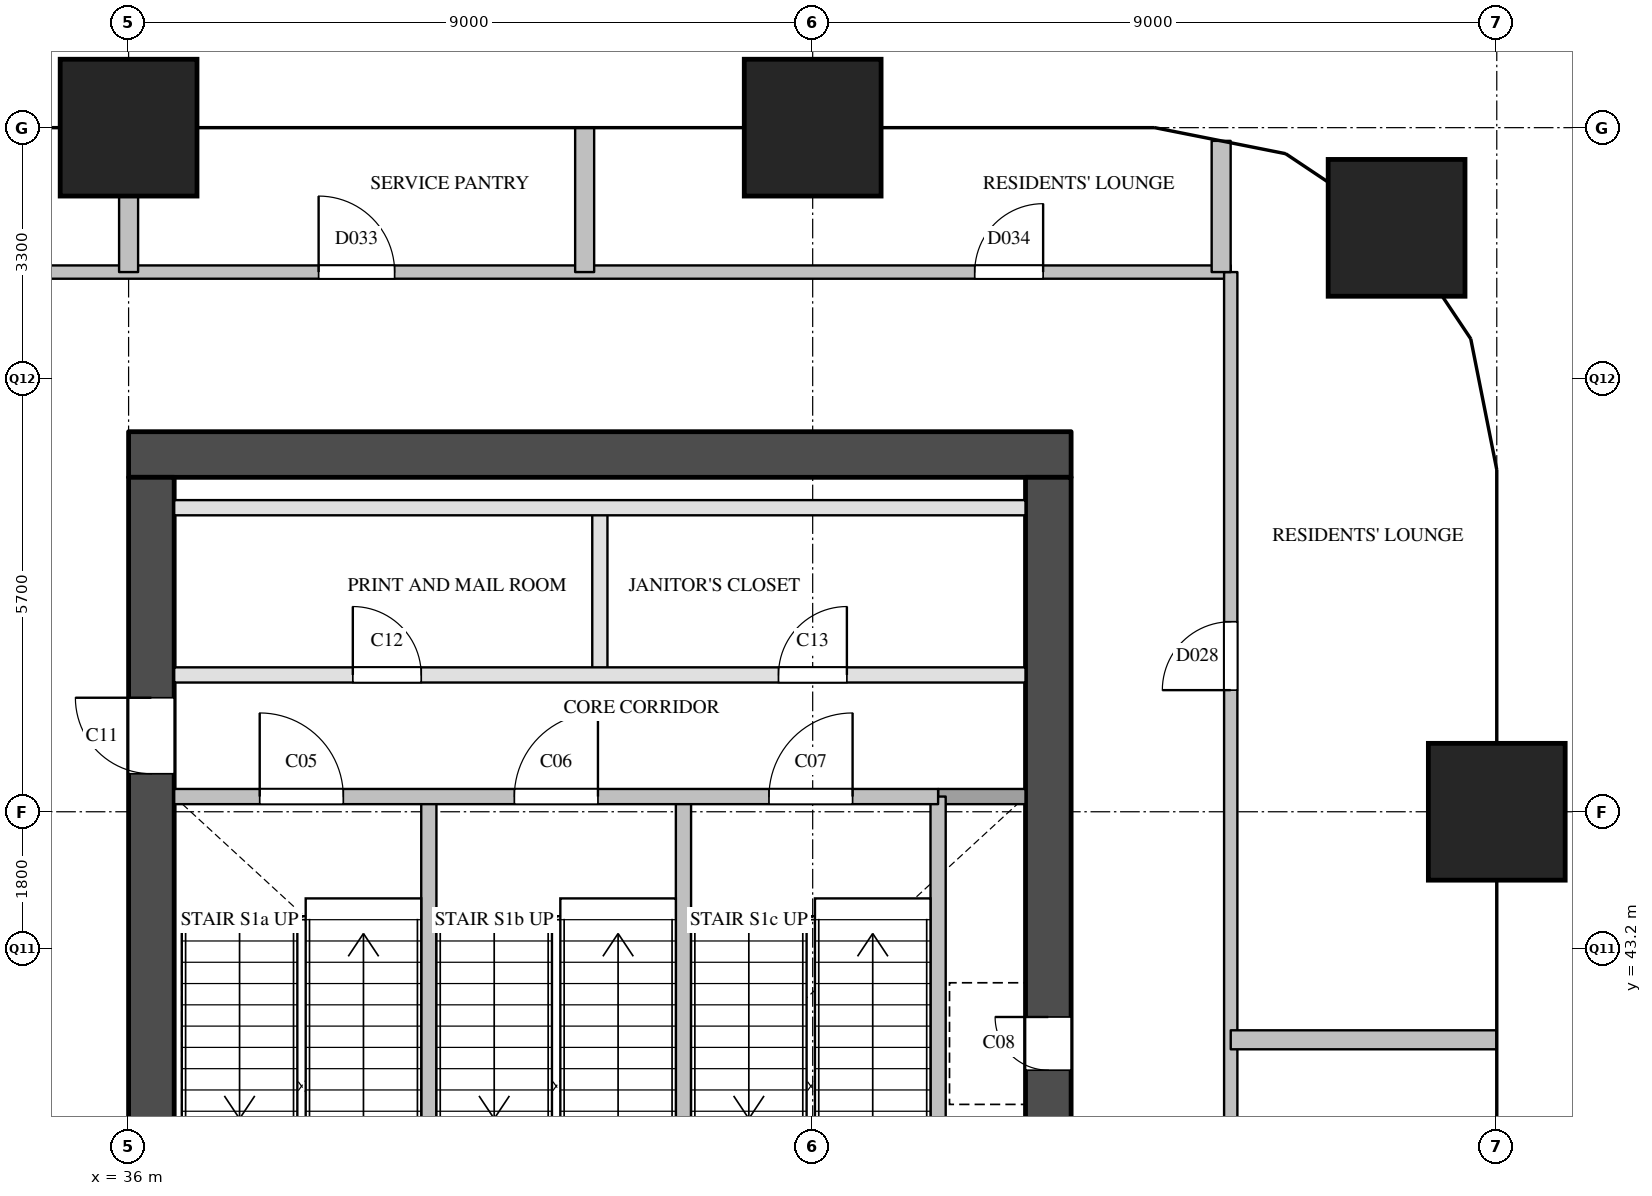
"""IFC4 building model, lengths in metres.
Left out: names, types, materials, properties, quantities, classifications, styles, units other than length and angle.
Written with IfcOpenShell. Run it as: python <this file> out.ifc"""

import sys

from ifc_helpers import new_model, si_unit, direction, frame, frame_2d, origin, origin_2d, place, context, subcontext, project, spatial, rectangle, extrude, element, fill, save


model = new_model("IFC4")
c1 = context("Model", 3, precision=1e-05, world=origin(), true_north=direction((0.0, 1.0)))
c2 = subcontext(c1, "Body", "Model", "MODEL_VIEW")
j1 = project(units=[si_unit("LENGTHUNIT", "METRE"), si_unit("PLANEANGLEUNIT", "RADIAN")], contexts=[c1])
p1 = place(None, origin())
s1 = spatial("IfcSite", under=j1, at=p1, CompositionType="ELEMENT")
p2 = place(p1, origin())
s2 = spatial("IfcBuilding", under=s1, at=p2, CompositionType="ELEMENT")
p3 = place(p2, frame((0.0, 0.0, 46.2)))
s3 = spatial("IfcBuildingStorey", under=s2, at=p3, CompositionType="ELEMENT", Elevation=46.2)
for number, where, z_axis, x_axis in (
    (1, (36.0, 54.0, 0.0), (0.0, 0.0, 1.0), (1.0, 0.0, 0.0)),
    (2, (45.0, 54.0, 0.0), (0.0, 0.0, 1.0), (1.0, 0.0, 0.0)),
    (3, (54.0, 45.0, 0.0), (0.0, 0.0, 1.0), (1.0, 0.0, 0.0)),
    (4, (52.682, 52.682, 0.0), (0.0, 0.0, 1.0), (1.0, 0.0, 0.0)),
):
    element("IfcColumn", number, at=place(p3, frame(where, z_axis=z_axis, x_axis=x_axis)), inside=s3, PredefinedType="COLUMN", context=c2, shape_type="SweptSolid", body=[
        extrude(rectangle(XDim=1.8, YDim=1.8, at=origin_2d()), origin(), (0.0, 0.0, 1.0), 3.8),
    ])
p4 = place(p3, frame((36.0, 49.7, 0.0), z_axis=(0.0, 0.0, 1.0), x_axis=(1.0, 0.0, 0.0)))
e5 = element("IfcWall", 5, at=p4, inside=s3, PredefinedType="SHEAR", context=c2, shape_type="SweptSolid", body=[
    extrude(rectangle(XDim=12.4, YDim=0.6, at=frame_2d((6.2, 0.0))), origin(), (0.0, 0.0, 1.0), 3.5),
])
p5 = place(p3, frame((36.3, 29.1, 0.0), z_axis=(0.0, 0.0, 1.0), x_axis=(0.0, 1.0, 0.0)))
e6 = element("IfcWall", 6, at=p5, inside=s3, PredefinedType="SHEAR", context=c2, shape_type="SweptSolid", body=[
    extrude(rectangle(XDim=20.3, YDim=0.6, at=frame_2d((10.15, 0.0))), origin(), (0.0, 0.0, 1.0), 3.5),
])
p6 = place(p5, frame((3.6, 0.0, 0.0)))
e7 = element("IfcOpeningElement", 7, at=p6, cuts=e6, PredefinedType="OPENING", context=c2, shape_type="SweptSolid", body=[
    extrude(rectangle(XDim=1.8, YDim=2.1, at=frame_2d((0.9, 1.05))), frame((0.0, 0.31, 0.0), z_axis=(0.0, -1.0, 0.0), x_axis=(1.0, 0.0, 0.0)), (0.0, 0.0, 1.0), 0.62),
])
p7 = place(p5, frame((16.4, 0.0, 0.0)))
e8 = element("IfcOpeningElement", 8, at=p7, cuts=e6, PredefinedType="OPENING", context=c2, shape_type="SweptSolid", body=[
    extrude(rectangle(XDim=1.0, YDim=2.1, at=frame_2d((0.5, 1.05))), frame((0.0, 0.31, 0.0), z_axis=(0.0, -1.0, 0.0), x_axis=(1.0, 0.0, 0.0)), (0.0, 0.0, 1.0), 0.62),
])
p8 = place(p3, frame((48.1, 29.1, 0.0), z_axis=(0.0, 0.0, 1.0), x_axis=(0.0, 1.0, 0.0)))
e9 = element("IfcWall", 9, at=p8, inside=s3, PredefinedType="SHEAR", context=c2, shape_type="SweptSolid", body=[
    extrude(rectangle(XDim=20.3, YDim=0.6, at=frame_2d((10.15, 0.0))), origin(), (0.0, 0.0, 1.0), 3.5),
])
p9 = place(p8, frame((12.5, 0.0, 0.0)))
e10 = element("IfcOpeningElement", 10, at=p9, cuts=e9, PredefinedType="OPENING", context=c2, shape_type="SweptSolid", body=[
    extrude(rectangle(XDim=0.7, YDim=2.1, at=frame_2d((0.35, 1.05))), frame((0.0, 0.31, 0.0), z_axis=(0.0, -1.0, 0.0), x_axis=(1.0, 0.0, 0.0)), (0.0, 0.0, 1.0), 0.62),
])
p10 = place(p8, frame((3.9, 0.0, 0.0)))
e11 = element("IfcOpeningElement", 11, at=p10, cuts=e9, PredefinedType="OPENING", context=c2, shape_type="SweptSolid", body=[
    extrude(rectangle(XDim=1.8, YDim=2.1, at=frame_2d((0.9, 1.05))), frame((0.0, 0.31, 0.0), z_axis=(0.0, -1.0, 0.0), x_axis=(1.0, 0.0, 0.0)), (0.0, 0.0, 1.0), 0.62),
])
p11 = place(p3, frame((39.95, 40.78, 0.0), z_axis=(0.0, 0.0, 1.0), x_axis=(0.0, 1.0, 0.0)))
e12 = element("IfcWall", 12, at=p11, inside=s3, PredefinedType="SOLIDWALL", context=c2, shape_type="SweptSolid", body=[
    extrude(rectangle(XDim=4.42, YDim=0.2, at=frame_2d((2.21, 0.0))), origin(), (0.0, 0.0, 1.0), 3.5),
])
p12 = place(p3, frame((42.2, 46.8, 0.0), z_axis=(0.0, 0.0, 1.0), x_axis=(0.0, 1.0, 0.0)))
e13 = element("IfcWall", 13, at=p12, inside=s3, PredefinedType="PARTITIONING", context=c2, shape_type="SweptSolid", body=[
    extrude(rectangle(XDim=2.2, YDim=0.2, at=frame_2d((1.1, 0.0))), origin(), (0.0, 0.0, 1.0), 3.5),
])
for number, where, z_axis, x_axis in (
    (14, (43.3, 40.78, 0.0), (0.0, 0.0, 1.0), (0.0, 1.0, 0.0)),
    (15, (46.65, 40.78, 0.0), (0.0, 0.0, 1.0), (0.0, 1.0, 0.0)),
):
    element("IfcWall", number, at=place(p3, frame(where, z_axis=z_axis, x_axis=x_axis)), inside=s3, PredefinedType="SOLIDWALL", context=c2, shape_type="SweptSolid", body=[
        extrude(rectangle(XDim=4.42, YDim=0.2, at=frame_2d((2.21, 0.0))), origin(), (0.0, 0.0, 1.0), 3.5),
    ])
p13 = place(p3, frame((46.65, 45.2, 0.0), z_axis=(0.0, 0.0, 1.0), x_axis=(1.0, 0.0, 0.0)))
e16 = element("IfcWall", 16, at=p13, inside=s3, PredefinedType="SOLIDWALL", context=c2, shape_type="SweptSolid", body=[
    extrude(rectangle(XDim=1.15, YDim=0.2, at=frame_2d((0.575, 0.0))), origin(), (0.0, 0.0, 1.0), 3.5),
])
p14 = place(p3, frame((36.6, 45.2, 0.0), z_axis=(0.0, 0.0, 1.0), x_axis=(1.0, 0.0, 0.0)))
e17 = element("IfcWall", 17, at=p14, inside=s3, PredefinedType="SOLIDWALL", context=c2, shape_type="SweptSolid", body=[
    extrude(rectangle(XDim=10.05, YDim=0.2, at=frame_2d((5.025, 0.0))), origin(), (0.0, 0.0, 1.0), 3.5),
])
p15 = place(p14, frame((1.125, 0.0, 0.0)))
e18 = element("IfcOpeningElement", 18, at=p15, cuts=e17, PredefinedType="OPENING", context=c2, shape_type="SweptSolid", body=[
    extrude(rectangle(XDim=1.1, YDim=2.1, at=frame_2d((0.55, 1.05))), frame((0.0, 0.11, 0.0), z_axis=(0.0, -1.0, 0.0), x_axis=(1.0, 0.0, 0.0)), (0.0, 0.0, 1.0), 0.22),
])
p16 = place(p14, frame((4.475, 0.0, 0.0)))
e19 = element("IfcOpeningElement", 19, at=p16, cuts=e17, PredefinedType="OPENING", context=c2, shape_type="SweptSolid", body=[
    extrude(rectangle(XDim=1.1, YDim=2.1, at=frame_2d((0.55, 1.05))), frame((0.0, 0.11, 0.0), z_axis=(0.0, -1.0, 0.0), x_axis=(1.0, 0.0, 0.0)), (0.0, 0.0, 1.0), 0.22),
])
p17 = place(p14, frame((7.825, 0.0, 0.0)))
e20 = element("IfcOpeningElement", 20, at=p17, cuts=e17, PredefinedType="OPENING", context=c2, shape_type="SweptSolid", body=[
    extrude(rectangle(XDim=1.1, YDim=2.1, at=frame_2d((0.55, 1.05))), frame((0.0, 0.11, 0.0), z_axis=(0.0, -1.0, 0.0), x_axis=(1.0, 0.0, 0.0)), (0.0, 0.0, 1.0), 0.22),
])
p18 = place(p3, frame((36.6, 46.8, 0.0), z_axis=(0.0, 0.0, 1.0), x_axis=(1.0, 0.0, 0.0)))
e21 = element("IfcWall", 21, at=p18, inside=s3, PredefinedType="PARTITIONING", context=c2, shape_type="SweptSolid", body=[
    extrude(rectangle(XDim=11.2, YDim=0.2, at=frame_2d((5.6, 0.0))), origin(), (0.0, 0.0, 1.0), 3.5),
])
p19 = place(p18, frame((2.35, 0.0, 0.0)))
e22 = element("IfcOpeningElement", 22, at=p19, cuts=e21, PredefinedType="OPENING", context=c2, shape_type="SweptSolid", body=[
    extrude(rectangle(XDim=0.9, YDim=2.1, at=frame_2d((0.45, 1.05))), frame((0.0, 0.11, 0.0), z_axis=(0.0, -1.0, 0.0), x_axis=(1.0, 0.0, 0.0)), (0.0, 0.0, 1.0), 0.22),
])
p20 = place(p18, frame((7.95, 0.0, 0.0)))
e23 = element("IfcOpeningElement", 23, at=p20, cuts=e21, PredefinedType="OPENING", context=c2, shape_type="SweptSolid", body=[
    extrude(rectangle(XDim=0.9, YDim=2.1, at=frame_2d((0.45, 1.05))), frame((0.0, 0.11, 0.0), z_axis=(0.0, -1.0, 0.0), x_axis=(1.0, 0.0, 0.0)), (0.0, 0.0, 1.0), 0.22),
])
p21 = place(p3, frame((36.6, 49.0, 0.0), z_axis=(0.0, 0.0, 1.0), x_axis=(1.0, 0.0, 0.0)))
e24 = element("IfcWall", 24, at=p21, inside=s3, PredefinedType="PARTITIONING", context=c2, shape_type="SweptSolid", body=[
    extrude(rectangle(XDim=11.2, YDim=0.2, at=frame_2d((5.6, 0.0))), origin(), (0.0, 0.0, 1.0), 3.5),
])
p22 = place(p3, frame((33.9, 52.1, 0.0), z_axis=(0.0, 0.0, 1.0), x_axis=(1.0, 0.0, 0.0)))
e25 = element("IfcWall", 25, at=p22, inside=s3, PredefinedType="PARTITIONING", context=c2, shape_type="SweptSolid", body=[
    extrude(rectangle(XDim=16.6, YDim=0.175, at=frame_2d((8.3, 0.0))), origin(), (0.0, 0.0, 1.0), 3.5),
])
p23 = place(p22, frame((4.6, 0.0, 0.0)))
e26 = element("IfcOpeningElement", 26, at=p23, cuts=e25, PredefinedType="OPENING", context=c2, shape_type="SweptSolid", body=[
    extrude(rectangle(XDim=1.0, YDim=2.1, at=frame_2d((0.5, 1.05))), frame((0.0, 0.097, 0.0), z_axis=(0.0, -1.0, 0.0), x_axis=(1.0, 0.0, 0.0)), (0.0, 0.0, 1.0), 0.195),
])
p24 = place(p22, frame((13.232, 0.0, 0.0)))
e27 = element("IfcOpeningElement", 27, at=p24, cuts=e25, PredefinedType="OPENING", context=c2, shape_type="SweptSolid", body=[
    extrude(rectangle(XDim=0.9, YDim=2.1, at=frame_2d((0.45, 1.05))), frame((0.0, 0.097, 0.0), z_axis=(0.0, -1.0, 0.0), x_axis=(1.0, 0.0, 0.0)), (0.0, 0.0, 1.0), 0.195),
])
p25 = place(p3, frame((50.5, 26.4, 0.0), z_axis=(0.0, 0.0, 1.0), x_axis=(0.0, 1.0, 0.0)))
e28 = element("IfcWall", 28, at=p25, inside=s3, PredefinedType="PARTITIONING", context=c2, shape_type="SweptSolid", body=[
    extrude(rectangle(XDim=25.7, YDim=0.175, at=frame_2d((12.85, 0.0))), origin(), (0.0, 0.0, 1.0), 2.5),
])
p26 = place(p25, frame((4.35, 0.0, 0.0)))
e29 = element("IfcOpeningElement", 29, at=p26, cuts=e28, PredefinedType="OPENING", context=c2, shape_type="SweptSolid", body=[
    extrude(rectangle(XDim=0.9, YDim=2.1, at=frame_2d((0.45, 1.05))), frame((0.0, 0.097, 0.0), z_axis=(0.0, -1.0, 0.0), x_axis=(1.0, 0.0, 0.0)), (0.0, 0.0, 1.0), 0.195),
])
p27 = place(p25, frame((12.15, 0.0, 0.0)))
e30 = element("IfcOpeningElement", 30, at=p27, cuts=e28, PredefinedType="OPENING", context=c2, shape_type="SweptSolid", body=[
    extrude(rectangle(XDim=0.9, YDim=2.1, at=frame_2d((0.45, 1.05))), frame((0.0, 0.097, 0.0), z_axis=(0.0, -1.0, 0.0), x_axis=(1.0, 0.0, 0.0)), (0.0, 0.0, 1.0), 0.195),
])
p28 = place(p25, frame((20.2, 0.0, 0.0)))
e31 = element("IfcOpeningElement", 31, at=p28, cuts=e28, PredefinedType="OPENING", context=c2, shape_type="SweptSolid", body=[
    extrude(rectangle(XDim=0.9, YDim=2.1, at=frame_2d((0.45, 1.05))), frame((0.0, 0.097, 0.0), z_axis=(0.0, -1.0, 0.0), x_axis=(1.0, 0.0, 0.0)), (0.0, 0.0, 1.0), 0.195),
])
p29 = place(p3, frame((50.5, 42.0, 0.0), z_axis=(0.0, 0.0, 1.0), x_axis=(1.0, 0.0, 0.0)))
e32 = element("IfcWall", 32, at=p29, inside=s3, PredefinedType="PARTITIONING", context=c2, shape_type="SweptSolid", body=[
    extrude(rectangle(XDim=3.5, YDim=0.25, at=frame_2d((1.75, 0.0))), origin(), (0.0, 0.0, 1.0), 2.5),
])
p30 = place(p3, frame((36.0, 52.1, 0.0), z_axis=(0.0, 0.0, 1.0), x_axis=(0.0, 1.0, 0.0)))
e33 = element("IfcWall", 33, at=p30, inside=s3, PredefinedType="PARTITIONING", context=c2, shape_type="SweptSolid", body=[
    extrude(rectangle(XDim=1.9, YDim=0.25, at=frame_2d((0.95, 0.0))), origin(), (0.0, 0.0, 1.0), 3.5),
])
p31 = place(p3, frame((42.0, 52.1, 0.0), z_axis=(0.0, 0.0, 1.0), x_axis=(0.0, 1.0, 0.0)))
e34 = element("IfcWall", 34, at=p31, inside=s3, PredefinedType="PARTITIONING", context=c2, shape_type="SweptSolid", body=[
    extrude(rectangle(XDim=1.9, YDim=0.25, at=frame_2d((0.95, 0.0))), origin(), (0.0, 0.0, 1.0), 2.5),
])
p32 = place(p3, frame((50.374, 52.1, 0.0), z_axis=(0.0, 0.0, 1.0), x_axis=(0.0, 1.0, 0.0)))
e35 = element("IfcWall", 35, at=p32, inside=s3, PredefinedType="PARTITIONING", context=c2, shape_type="SweptSolid", body=[
    extrude(rectangle(XDim=1.726, YDim=0.25, at=frame_2d((0.863, 0.0))), origin(), (0.0, 0.0, 1.0), 2.5),
])
p33 = place(p15, origin())
e36 = element("IfcDoor", 36, at=p33, inside=s3, OperationType="SINGLE_SWING_LEFT", PredefinedType="DOOR", context=c2, shape_type="SweptSolid", body=[
    extrude(rectangle(XDim=1.1, YDim=2.1, at=frame_2d((0.55, 1.05))), frame((0.0, 0.025, 0.0), z_axis=(0.0, -1.0, 0.0), x_axis=(1.0, 0.0, 0.0)), (0.0, 0.0, 1.0), 0.05),
])
fill(e18, e36)
p34 = place(p16, origin())
e37 = element("IfcDoor", 37, at=p34, inside=s3, OperationType="SINGLE_SWING_RIGHT", PredefinedType="DOOR", context=c2, shape_type="SweptSolid", body=[
    extrude(rectangle(XDim=1.1, YDim=2.1, at=frame_2d((0.55, 1.05))), frame((0.0, 0.025, 0.0), z_axis=(0.0, -1.0, 0.0), x_axis=(1.0, 0.0, 0.0)), (0.0, 0.0, 1.0), 0.05),
])
fill(e19, e37)
p35 = place(p17, origin())
e38 = element("IfcDoor", 38, at=p35, inside=s3, OperationType="SINGLE_SWING_RIGHT", PredefinedType="DOOR", context=c2, shape_type="SweptSolid", body=[
    extrude(rectangle(XDim=1.1, YDim=2.1, at=frame_2d((0.55, 1.05))), frame((0.0, 0.025, 0.0), z_axis=(0.0, -1.0, 0.0), x_axis=(1.0, 0.0, 0.0)), (0.0, 0.0, 1.0), 0.05),
])
fill(e20, e38)
p36 = place(p9, origin())
e39 = element("IfcDoor", 39, at=p36, inside=s3, OperationType="SINGLE_SWING_RIGHT", PredefinedType="DOOR", context=c2, shape_type="SweptSolid", body=[
    extrude(rectangle(XDim=0.7, YDim=2.1, at=frame_2d((0.35, 1.05))), frame((0.0, 0.025, 0.0), z_axis=(0.0, -1.0, 0.0), x_axis=(1.0, 0.0, 0.0)), (0.0, 0.0, 1.0), 0.05),
])
fill(e10, e39)
p37 = place(p7, origin())
e40 = element("IfcDoor", 40, at=p37, inside=s3, OperationType="SINGLE_SWING_RIGHT", PredefinedType="DOOR", context=c2, shape_type="SweptSolid", body=[
    extrude(rectangle(XDim=1.0, YDim=2.1, at=frame_2d((0.5, 1.05))), frame((0.0, 0.025, 0.0), z_axis=(0.0, -1.0, 0.0), x_axis=(1.0, 0.0, 0.0)), (0.0, 0.0, 1.0), 0.05),
])
fill(e8, e40)
p38 = place(p19, origin())
e41 = element("IfcDoor", 41, at=p38, inside=s3, OperationType="SINGLE_SWING_LEFT", PredefinedType="DOOR", context=c2, shape_type="SweptSolid", body=[
    extrude(rectangle(XDim=0.9, YDim=2.1, at=frame_2d((0.45, 1.05))), frame((0.0, 0.025, 0.0), z_axis=(0.0, -1.0, 0.0), x_axis=(1.0, 0.0, 0.0)), (0.0, 0.0, 1.0), 0.05),
])
fill(e22, e41)
p39 = place(p20, origin())
e42 = element("IfcDoor", 42, at=p39, inside=s3, OperationType="SINGLE_SWING_RIGHT", PredefinedType="DOOR", context=c2, shape_type="SweptSolid", body=[
    extrude(rectangle(XDim=0.9, YDim=2.1, at=frame_2d((0.45, 1.05))), frame((0.0, 0.025, 0.0), z_axis=(0.0, -1.0, 0.0), x_axis=(1.0, 0.0, 0.0)), (0.0, 0.0, 1.0), 0.05),
])
fill(e23, e42)
p40 = place(p28, origin())
e43 = element("IfcDoor", 43, at=p40, inside=s3, OperationType="SINGLE_SWING_LEFT", PredefinedType="DOOR", context=c2, shape_type="SweptSolid", body=[
    extrude(rectangle(XDim=0.9, YDim=2.1, at=frame_2d((0.45, 1.05))), frame((0.0, 0.025, 0.0), z_axis=(0.0, -1.0, 0.0), x_axis=(1.0, 0.0, 0.0)), (0.0, 0.0, 1.0), 0.05),
])
fill(e31, e43)
p41 = place(p23, origin())
e44 = element("IfcDoor", 44, at=p41, inside=s3, OperationType="SINGLE_SWING_LEFT", PredefinedType="DOOR", context=c2, shape_type="SweptSolid", body=[
    extrude(rectangle(XDim=1.0, YDim=2.1, at=frame_2d((0.5, 1.05))), frame((0.0, 0.025, 0.0), z_axis=(0.0, -1.0, 0.0), x_axis=(1.0, 0.0, 0.0)), (0.0, 0.0, 1.0), 0.05),
])
fill(e26, e44)
p42 = place(p24, origin())
e45 = element("IfcDoor", 45, at=p42, inside=s3, OperationType="SINGLE_SWING_RIGHT", PredefinedType="DOOR", context=c2, shape_type="SweptSolid", body=[
    extrude(rectangle(XDim=0.9, YDim=2.1, at=frame_2d((0.45, 1.05))), frame((0.0, 0.025, 0.0), z_axis=(0.0, -1.0, 0.0), x_axis=(1.0, 0.0, 0.0)), (0.0, 0.0, 1.0), 0.05),
])
fill(e27, e45)
save(model, sys.argv[1])
